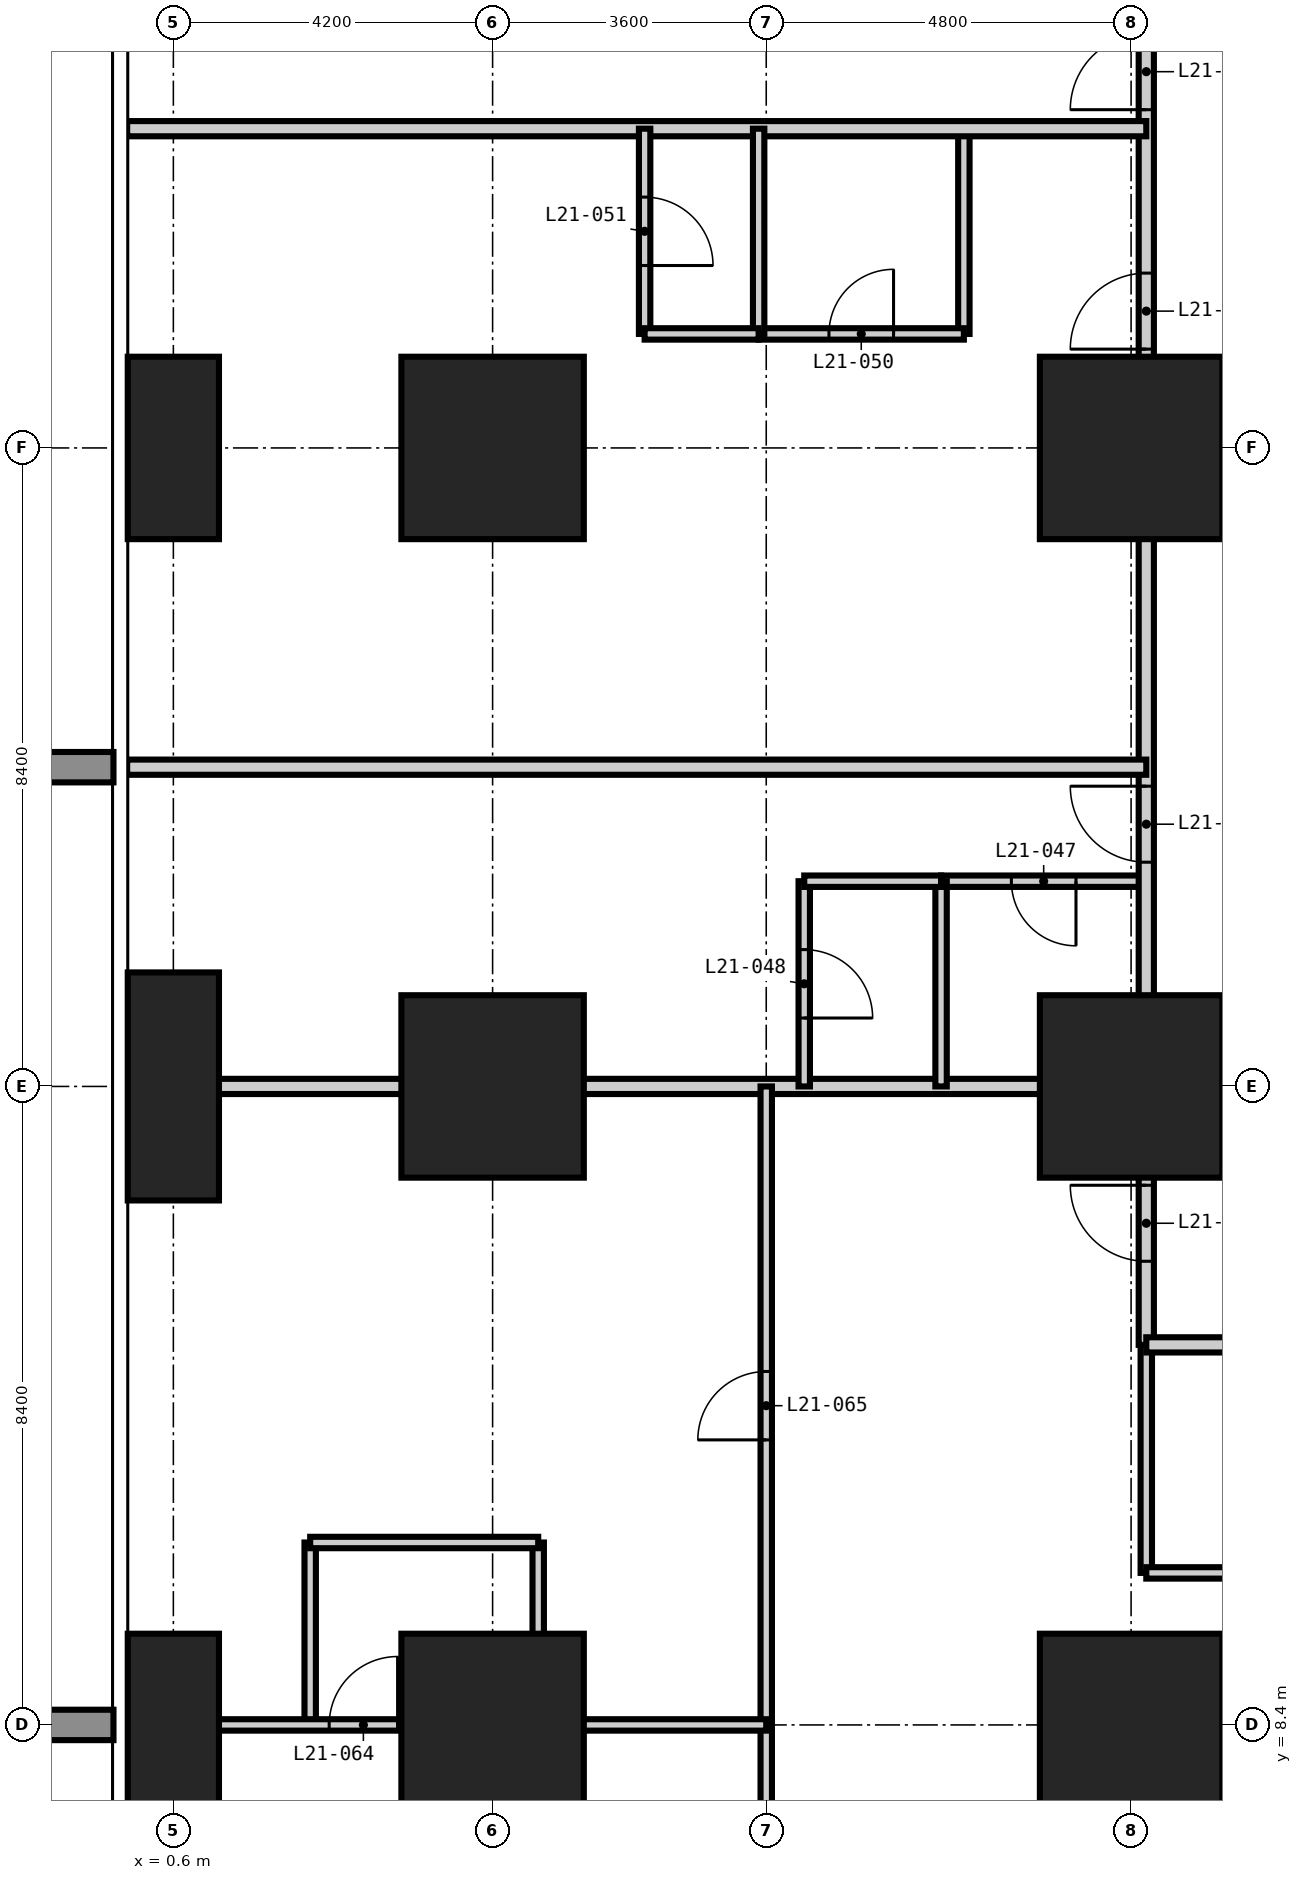
"""IFC4 building model, lengths in metres.
Left out: names, types, materials, properties, quantities, classifications, styles, units other than length and angle.
Written with IfcOpenShell. Run it as: python <this file> out.ifc"""

import sys

from ifc_helpers import new_model, si_unit, direction, frame, frame_2d, origin, origin_2d, place, context, subcontext, project, spatial, rectangle, extrude, element, fill, save


model = new_model("IFC4")
c1 = context("Model", 3, precision=1e-05, world=origin(), true_north=direction((0.0, 1.0)))
c2 = subcontext(c1, "Body", "Model", "MODEL_VIEW")
j1 = project(units=[si_unit("LENGTHUNIT", "METRE"), si_unit("PLANEANGLEUNIT", "RADIAN")], contexts=[c1])
p1 = place(None, origin())
s1 = spatial("IfcSite", under=j1, at=p1, CompositionType="ELEMENT")
p2 = place(p1, origin())
s2 = spatial("IfcBuilding", under=s1, at=p2, CompositionType="ELEMENT")
p3 = place(p2, frame((0.0, 0.0, 84.6)))
s3 = spatial("IfcBuildingStorey", under=s2, at=p3, CompositionType="ELEMENT", Elevation=84.6)
p4 = place(p3, frame((0.6, 8.4, -0.35), z_axis=(0.0, 0.0, 1.0), x_axis=(1.0, 0.0, 0.0)))
e1 = element("IfcColumn", 1, at=p4, inside=s3, PredefinedType="COLUMN", context=c2, shape_type="SweptSolid", body=[
    extrude(rectangle(XDim=1.2, YDim=2.4, at=origin_2d()), origin(), (0.0, 0.0, 1.0), 3.55),
])
p5 = place(p3, frame((0.6, 16.8, -0.35), z_axis=(0.0, 0.0, 1.0), x_axis=(1.0, 0.0, 0.0)))
e2 = element("IfcColumn", 2, at=p5, inside=s3, PredefinedType="COLUMN", context=c2, shape_type="SweptSolid", body=[
    extrude(rectangle(XDim=1.2, YDim=3.0, at=origin_2d()), origin(), (0.0, 0.0, 1.0), 3.55),
])
p6 = place(p3, frame((0.6, 25.2, -0.35), z_axis=(0.0, 0.0, 1.0), x_axis=(1.0, 0.0, 0.0)))
e3 = element("IfcColumn", 3, at=p6, inside=s3, PredefinedType="COLUMN", context=c2, shape_type="SweptSolid", body=[
    extrude(rectangle(XDim=1.2, YDim=2.4, at=origin_2d()), origin(), (0.0, 0.0, 1.0), 3.55),
])
for number, where, z_axis, x_axis in (
    (4, (4.8, 8.4, -0.35), (0.0, 0.0, 1.0), (1.0, 0.0, 0.0)),
    (5, (4.8, 16.8, -0.35), (0.0, 0.0, 1.0), (1.0, 0.0, 0.0)),
    (6, (4.8, 25.2, -0.35), (0.0, 0.0, 1.0), (1.0, 0.0, 0.0)),
    (7, (13.2, 8.4, -0.35), (0.0, 0.0, 1.0), (1.0, 0.0, 0.0)),
    (8, (13.2, 16.8, -0.35), (0.0, 0.0, 1.0), (1.0, 0.0, 0.0)),
    (9, (13.2, 25.2, -0.35), (0.0, 0.0, 1.0), (1.0, 0.0, 0.0)),
):
    element("IfcColumn", number, at=place(p3, frame(where, z_axis=z_axis, x_axis=x_axis)), inside=s3, PredefinedType="COLUMN", context=c2, shape_type="SweptSolid", body=[
        extrude(rectangle(XDim=2.4, YDim=2.4, at=origin_2d()), origin(), (0.0, 0.0, 1.0), 3.55),
    ])
p7 = place(p3, frame((5.4, 4.8, 0.0), z_axis=(0.0, 0.0, 1.0), x_axis=(0.0, 1.0, 0.0)))
e10 = element("IfcWall", 10, at=p7, inside=s3, PredefinedType="PARTITIONING", context=c2, shape_type="SweptSolid", body=[
    extrude(rectangle(XDim=3.6, YDim=0.15, at=frame_2d((1.8, 0.0))), origin(), (0.0, 0.0, 1.0), 3.2),
])
p8 = place(p7, frame((1.375, 0.0, 0.0)))
e11 = element("IfcOpeningElement", 11, at=p8, cuts=e10, PredefinedType="OPENING", context=c2, shape_type="SweptSolid", body=[
    extrude(rectangle(XDim=0.85, YDim=2.1, at=frame_2d((0.425, 1.05))), frame((0.0, 0.085, 0.0), z_axis=(0.0, -1.0, 0.0), x_axis=(1.0, 0.0, 0.0)), (0.0, 0.0, 1.0), 0.17),
])
p9 = place(p3, frame((11.0, 26.7, 0.0), z_axis=(0.0, 0.0, 1.0), x_axis=(0.0, 1.0, 0.0)))
e12 = element("IfcWall", 12, at=p9, inside=s3, PredefinedType="PARTITIONING", context=c2, shape_type="SweptSolid", body=[
    extrude(rectangle(XDim=2.7, YDim=0.15, at=frame_2d((1.35, 0.0))), origin(), (0.0, 0.0, 1.0), 3.2),
])
p10 = place(p3, frame((13.4, 10.4, 0.0), z_axis=(0.0, 0.0, 1.0), x_axis=(0.0, 1.0, 0.0)))
e13 = element("IfcWall", 13, at=p10, inside=s3, PredefinedType="PARTITIONING", context=c2, shape_type="SweptSolid", body=[
    extrude(rectangle(XDim=3.0, YDim=0.15, at=frame_2d((1.5, 0.0))), origin(), (0.0, 0.0, 1.0), 3.2),
])
p11 = place(p3, frame((13.4, 10.4, 0.0), z_axis=(0.0, 0.0, 1.0), x_axis=(1.0, 0.0, 0.0)))
e14 = element("IfcWall", 14, at=p11, inside=s3, PredefinedType="PARTITIONING", context=c2, shape_type="SweptSolid", body=[
    extrude(rectangle(XDim=3.4, YDim=0.15, at=frame_2d((1.7, 0.0))), origin(), (0.0, 0.0, 1.0), 3.2),
])
p12 = place(p11, frame((1.275, 0.0, 0.0)))
e15 = element("IfcOpeningElement", 15, at=p12, cuts=e14, PredefinedType="OPENING", context=c2, shape_type="SweptSolid", body=[
    extrude(rectangle(XDim=0.85, YDim=2.1, at=frame_2d((0.425, 1.05))), frame((0.0, 0.085, 0.0), z_axis=(0.0, -1.0, 0.0), x_axis=(1.0, 0.0, 0.0)), (0.0, 0.0, 1.0), 0.17),
])
p13 = place(p3, frame((10.7, 19.5, 0.0), z_axis=(0.0, 0.0, 1.0), x_axis=(1.0, 0.0, 0.0)))
e16 = element("IfcWall", 16, at=p13, inside=s3, PredefinedType="PARTITIONING", context=c2, shape_type="SweptSolid", body=[
    extrude(rectangle(XDim=2.7, YDim=0.15, at=frame_2d((1.35, 0.0))), origin(), (0.0, 0.0, 1.0), 3.2),
])
p14 = place(p13, frame((0.925, 0.0, 0.0)))
e17 = element("IfcOpeningElement", 17, at=p14, cuts=e16, PredefinedType="OPENING", context=c2, shape_type="SweptSolid", body=[
    extrude(rectangle(XDim=0.85, YDim=2.1, at=frame_2d((0.425, 1.05))), frame((0.0, 0.085, 0.0), z_axis=(0.0, -1.0, 0.0), x_axis=(1.0, 0.0, 0.0)), (0.0, 0.0, 1.0), 0.17),
])
p15 = place(p3, frame((8.3, 26.7, 0.0), z_axis=(0.0, 0.0, 1.0), x_axis=(1.0, 0.0, 0.0)))
e18 = element("IfcWall", 18, at=p15, inside=s3, PredefinedType="PARTITIONING", context=c2, shape_type="SweptSolid", body=[
    extrude(rectangle(XDim=2.7, YDim=0.15, at=frame_2d((1.35, 0.0))), origin(), (0.0, 0.0, 1.0), 3.2),
])
p16 = place(p15, frame((0.925, 0.0, 0.0)))
e19 = element("IfcOpeningElement", 19, at=p16, cuts=e18, PredefinedType="OPENING", context=c2, shape_type="SweptSolid", body=[
    extrude(rectangle(XDim=0.85, YDim=2.1, at=frame_2d((0.425, 1.05))), frame((0.0, 0.085, 0.0), z_axis=(0.0, -1.0, 0.0), x_axis=(1.0, 0.0, 0.0)), (0.0, 0.0, 1.0), 0.17),
])
p17 = place(p3, frame((13.4, 13.4, 0.0), z_axis=(0.0, 0.0, 1.0), x_axis=(0.0, 1.0, 0.0)))
e20 = element("IfcWall", 20, at=p17, inside=s3, PredefinedType="PARTITIONING", context=c2, shape_type="SweptSolid", body=[
    extrude(rectangle(XDim=22.6, YDim=0.2, at=frame_2d((11.3, 0.0))), origin(), (0.0, 0.0, 1.0), 3.2),
])
p18 = place(p17, frame((6.35, 0.0, 0.0)))
e21 = element("IfcOpeningElement", 21, at=p18, cuts=e20, PredefinedType="OPENING", context=c2, shape_type="SweptSolid", body=[
    extrude(rectangle(XDim=1.0, YDim=2.2, at=frame_2d((0.5, 1.1))), frame((0.0, 0.11, 0.0), z_axis=(0.0, -1.0, 0.0), x_axis=(1.0, 0.0, 0.0)), (0.0, 0.0, 1.0), 0.22),
])
p19 = place(p17, frame((13.1, 0.0, 0.0)))
e22 = element("IfcOpeningElement", 22, at=p19, cuts=e20, PredefinedType="OPENING", context=c2, shape_type="SweptSolid", body=[
    extrude(rectangle(XDim=1.0, YDim=2.2, at=frame_2d((0.5, 1.1))), frame((0.0, 0.11, 0.0), z_axis=(0.0, -1.0, 0.0), x_axis=(1.0, 0.0, 0.0)), (0.0, 0.0, 1.0), 0.22),
])
p20 = place(p17, frame((16.25, 0.0, 0.0)))
e23 = element("IfcOpeningElement", 23, at=p20, cuts=e20, PredefinedType="OPENING", context=c2, shape_type="SweptSolid", body=[
    extrude(rectangle(XDim=1.0, YDim=2.2, at=frame_2d((0.5, 1.1))), frame((0.0, 0.11, 0.0), z_axis=(0.0, -1.0, 0.0), x_axis=(1.0, 0.0, 0.0)), (0.0, 0.0, 1.0), 0.22),
])
p21 = place(p17, frame((1.1, 0.0, 0.0)))
e24 = element("IfcOpeningElement", 24, at=p21, cuts=e20, PredefinedType="OPENING", context=c2, shape_type="SweptSolid", body=[
    extrude(rectangle(XDim=1.0, YDim=2.2, at=frame_2d((0.5, 1.1))), frame((0.0, 0.11, 0.0), z_axis=(0.0, -1.0, 0.0), x_axis=(1.0, 0.0, 0.0)), (0.0, 0.0, 1.0), 0.22),
])
p22 = place(p3, frame((46.0, 13.4, 0.0), z_axis=(0.0, 0.0, 1.0), x_axis=(-1.0, 0.0, 0.0)))
e25 = element("IfcWall", 25, at=p22, inside=s3, PredefinedType="PARTITIONING", context=c2, shape_type="SweptSolid", body=[
    extrude(rectangle(XDim=32.6, YDim=0.2, at=frame_2d((16.3, 0.0))), origin(), (0.0, 0.0, 1.0), 3.2),
])
p23 = place(p22, frame((26.6, 0.0, 0.0)))
e26 = element("IfcOpeningElement", 26, at=p23, cuts=e25, PredefinedType="OPENING", context=c2, shape_type="SweptSolid", body=[
    extrude(rectangle(XDim=1.0, YDim=2.2, at=frame_2d((0.5, 1.1))), frame((0.0, 0.11, 0.0), z_axis=(0.0, -1.0, 0.0), x_axis=(1.0, 0.0, 0.0)), (0.0, 0.0, 1.0), 0.22),
])
p24 = place(p22, frame((19.1, 0.0, 0.0)))
e27 = element("IfcOpeningElement", 27, at=p24, cuts=e25, PredefinedType="OPENING", context=c2, shape_type="SweptSolid", body=[
    extrude(rectangle(XDim=1.0, YDim=2.2, at=frame_2d((0.5, 1.1))), frame((0.0, 0.11, 0.0), z_axis=(0.0, -1.0, 0.0), x_axis=(1.0, 0.0, 0.0)), (0.0, 0.0, 1.0), 0.22),
])
p25 = place(p22, frame((13.1, 0.0, 0.0)))
e28 = element("IfcOpeningElement", 28, at=p25, cuts=e25, PredefinedType="OPENING", context=c2, shape_type="SweptSolid", body=[
    extrude(rectangle(XDim=1.0, YDim=2.2, at=frame_2d((0.5, 1.1))), frame((0.0, 0.11, 0.0), z_axis=(0.0, -1.0, 0.0), x_axis=(1.0, 0.0, 0.0)), (0.0, 0.0, 1.0), 0.22),
])
p26 = place(p22, frame((5.6, 0.0, 0.0)))
e29 = element("IfcOpeningElement", 29, at=p26, cuts=e25, PredefinedType="OPENING", context=c2, shape_type="SweptSolid", body=[
    extrude(rectangle(XDim=1.0, YDim=2.2, at=frame_2d((0.5, 1.1))), frame((0.0, 0.11, 0.0), z_axis=(0.0, -1.0, 0.0), x_axis=(1.0, 0.0, 0.0)), (0.0, 0.0, 1.0), 0.22),
])
for number, where, z_axis, x_axis in (
    (30, (-0.008, 16.8, 0.0), (0.0, 0.0, 1.0), (1.0, 0.0, 0.0)),
    (31, (-0.008, 21.0, 0.0), (0.0, 0.0, 1.0), (1.0, 0.0, 0.0)),
    (32, (-0.008, 29.4, 0.0), (0.0, 0.0, 1.0), (1.0, 0.0, 0.0)),
):
    element("IfcWall", number, at=place(p3, frame(where, z_axis=z_axis, x_axis=x_axis)), inside=s3, PredefinedType="PARTITIONING", context=c2, shape_type="SweptSolid", body=[
        extrude(rectangle(XDim=13.408, YDim=0.2, at=frame_2d((6.704, 0.0))), origin(), (0.0, 0.0, 1.0), 3.2),
    ])
for number, where, z_axis, x_axis in (
    (33, (2.4, 8.4, 0.0), (0.0, 0.0, 1.0), (0.0, 1.0, 0.0)),
    (34, (5.4, 8.4, 0.0), (0.0, 0.0, 1.0), (0.0, 1.0, 0.0)),
):
    element("IfcWall", number, at=place(p3, frame(where, z_axis=z_axis, x_axis=x_axis)), inside=s3, PredefinedType="PARTITIONING", context=c2, shape_type="SweptSolid", body=[
        extrude(rectangle(XDim=2.4, YDim=0.15, at=frame_2d((1.2, 0.0))), origin(), (0.0, 0.0, 1.0), 3.2),
    ])
p27 = place(p3, frame((6.8, 26.7, 0.0), z_axis=(0.0, 0.0, 1.0), x_axis=(0.0, 1.0, 0.0)))
e35 = element("IfcWall", 35, at=p27, inside=s3, PredefinedType="PARTITIONING", context=c2, shape_type="SweptSolid", body=[
    extrude(rectangle(XDim=2.7, YDim=0.15, at=frame_2d((1.35, 0.0))), origin(), (0.0, 0.0, 1.0), 3.2),
])
p28 = place(p27, frame((0.9, 0.0, 0.0)))
e36 = element("IfcOpeningElement", 36, at=p28, cuts=e35, PredefinedType="OPENING", context=c2, shape_type="SweptSolid", body=[
    extrude(rectangle(XDim=0.9, YDim=2.1, at=frame_2d((0.45, 1.05))), frame((0.0, 0.085, 0.0), z_axis=(0.0, -1.0, 0.0), x_axis=(1.0, 0.0, 0.0)), (0.0, 0.0, 1.0), 0.17),
])
p29 = place(p3, frame((8.3, 26.7, 0.0), z_axis=(0.0, 0.0, 1.0), x_axis=(0.0, 1.0, 0.0)))
e37 = element("IfcWall", 37, at=p29, inside=s3, PredefinedType="PARTITIONING", context=c2, shape_type="SweptSolid", body=[
    extrude(rectangle(XDim=2.7, YDim=0.15, at=frame_2d((1.35, 0.0))), origin(), (0.0, 0.0, 1.0), 3.2),
])
p30 = place(p3, frame((8.4, -0.008, 0.0), z_axis=(0.0, 0.0, 1.0), x_axis=(0.0, 1.0, 0.0)))
e38 = element("IfcWall", 38, at=p30, inside=s3, PredefinedType="PARTITIONING", context=c2, shape_type="SweptSolid", body=[
    extrude(rectangle(XDim=16.808, YDim=0.15, at=frame_2d((8.404, 0.0))), origin(), (0.0, 0.0, 1.0), 3.2),
])
p31 = place(p30, frame((1.958, 0.0, 0.0)))
e39 = element("IfcOpeningElement", 39, at=p31, cuts=e38, PredefinedType="OPENING", context=c2, shape_type="SweptSolid", body=[
    extrude(rectangle(XDim=0.9, YDim=2.1, at=frame_2d((0.45, 1.05))), frame((0.0, 0.085, 0.0), z_axis=(0.0, -1.0, 0.0), x_axis=(1.0, 0.0, 0.0)), (0.0, 0.0, 1.0), 0.17),
])
p32 = place(p30, frame((12.158, 0.0, 0.0)))
e40 = element("IfcOpeningElement", 40, at=p32, cuts=e38, PredefinedType="OPENING", context=c2, shape_type="SweptSolid", body=[
    extrude(rectangle(XDim=0.9, YDim=2.1, at=frame_2d((0.45, 1.05))), frame((0.0, 0.085, 0.0), z_axis=(0.0, -1.0, 0.0), x_axis=(1.0, 0.0, 0.0)), (0.0, 0.0, 1.0), 0.17),
])
p33 = place(p3, frame((8.9, 16.8, 0.0), z_axis=(0.0, 0.0, 1.0), x_axis=(0.0, 1.0, 0.0)))
e41 = element("IfcWall", 41, at=p33, inside=s3, PredefinedType="PARTITIONING", context=c2, shape_type="SweptSolid", body=[
    extrude(rectangle(XDim=2.7, YDim=0.15, at=frame_2d((1.35, 0.0))), origin(), (0.0, 0.0, 1.0), 3.2),
])
p34 = place(p33, frame((0.9, 0.0, 0.0)))
e42 = element("IfcOpeningElement", 42, at=p34, cuts=e41, PredefinedType="OPENING", context=c2, shape_type="SweptSolid", body=[
    extrude(rectangle(XDim=0.9, YDim=2.1, at=frame_2d((0.45, 1.05))), frame((0.0, 0.085, 0.0), z_axis=(0.0, -1.0, 0.0), x_axis=(1.0, 0.0, 0.0)), (0.0, 0.0, 1.0), 0.17),
])
p35 = place(p3, frame((10.7, 16.8, 0.0), z_axis=(0.0, 0.0, 1.0), x_axis=(0.0, 1.0, 0.0)))
e43 = element("IfcWall", 43, at=p35, inside=s3, PredefinedType="PARTITIONING", context=c2, shape_type="SweptSolid", body=[
    extrude(rectangle(XDim=2.7, YDim=0.15, at=frame_2d((1.35, 0.0))), origin(), (0.0, 0.0, 1.0), 3.2),
])
p36 = place(p3, frame((-0.008, 8.4, 0.0), z_axis=(0.0, 0.0, 1.0), x_axis=(1.0, 0.0, 0.0)))
e44 = element("IfcWall", 44, at=p36, inside=s3, PredefinedType="PARTITIONING", context=c2, shape_type="SweptSolid", body=[
    extrude(rectangle(XDim=8.408, YDim=0.15, at=frame_2d((4.204, 0.0))), origin(), (0.0, 0.0, 1.0), 3.2),
])
p37 = place(p36, frame((2.658, 0.0, 0.0)))
e45 = element("IfcOpeningElement", 45, at=p37, cuts=e44, PredefinedType="OPENING", context=c2, shape_type="SweptSolid", body=[
    extrude(rectangle(XDim=0.9, YDim=2.1, at=frame_2d((0.45, 1.05))), frame((0.0, 0.085, 0.0), z_axis=(0.0, -1.0, 0.0), x_axis=(1.0, 0.0, 0.0)), (0.0, 0.0, 1.0), 0.17),
])
p38 = place(p3, frame((2.4, 10.8, 0.0), z_axis=(0.0, 0.0, 1.0), x_axis=(1.0, 0.0, 0.0)))
e46 = element("IfcWall", 46, at=p38, inside=s3, PredefinedType="PARTITIONING", context=c2, shape_type="SweptSolid", body=[
    extrude(rectangle(XDim=3.0, YDim=0.15, at=frame_2d((1.5, 0.0))), origin(), (0.0, 0.0, 1.0), 3.2),
])
p39 = place(p3, frame((8.9, 19.5, 0.0), z_axis=(0.0, 0.0, 1.0), x_axis=(1.0, 0.0, 0.0)))
e47 = element("IfcWall", 47, at=p39, inside=s3, PredefinedType="PARTITIONING", context=c2, shape_type="SweptSolid", body=[
    extrude(rectangle(XDim=1.8, YDim=0.15, at=frame_2d((0.9, 0.0))), origin(), (0.0, 0.0, 1.0), 3.2),
])
p40 = place(p3, frame((6.8, 26.7, 0.0), z_axis=(0.0, 0.0, 1.0), x_axis=(1.0, 0.0, 0.0)))
e48 = element("IfcWall", 48, at=p40, inside=s3, PredefinedType="PARTITIONING", context=c2, shape_type="SweptSolid", body=[
    extrude(rectangle(XDim=1.5, YDim=0.15, at=frame_2d((0.75, 0.0))), origin(), (0.0, 0.0, 1.0), 3.2),
])
p41 = place(p18, origin())
e49 = element("IfcDoor", 49, at=p41, inside=s3, OperationType="SINGLE_SWING_RIGHT", PredefinedType="DOOR", context=c2, shape_type="SweptSolid", body=[
    extrude(rectangle(XDim=1.0, YDim=2.2, at=frame_2d((0.5, 1.1))), frame((0.0, 0.025, 0.0), z_axis=(0.0, -1.0, 0.0), x_axis=(1.0, 0.0, 0.0)), (0.0, 0.0, 1.0), 0.05),
])
fill(e21, e49)
p42 = place(p14, frame((0.85, 0.0, 0.0), z_axis=(0.0, 0.0, 1.0), x_axis=(-1.0, 0.0, 0.0)))
e50 = element("IfcDoor", 50, at=p42, inside=s3, OperationType="SINGLE_SWING_LEFT", PredefinedType="DOOR", context=c2, shape_type="SweptSolid", body=[
    extrude(rectangle(XDim=0.85, YDim=2.1, at=frame_2d((0.425, 1.05))), frame((0.0, 0.025, 0.0), z_axis=(0.0, -1.0, 0.0), x_axis=(1.0, 0.0, 0.0)), (0.0, 0.0, 1.0), 0.05),
])
fill(e17, e50)
p43 = place(p34, frame((0.9, 0.0, 0.0), z_axis=(0.0, 0.0, 1.0), x_axis=(-1.0, 0.0, 0.0)))
e51 = element("IfcDoor", 51, at=p43, inside=s3, OperationType="SINGLE_SWING_RIGHT", PredefinedType="DOOR", context=c2, shape_type="SweptSolid", body=[
    extrude(rectangle(XDim=0.9, YDim=2.1, at=frame_2d((0.45, 1.05))), frame((0.0, 0.025, 0.0), z_axis=(0.0, -1.0, 0.0), x_axis=(1.0, 0.0, 0.0)), (0.0, 0.0, 1.0), 0.05),
])
fill(e42, e51)
p44 = place(p19, origin())
e52 = element("IfcDoor", 52, at=p44, inside=s3, OperationType="SINGLE_SWING_LEFT", PredefinedType="DOOR", context=c2, shape_type="SweptSolid", body=[
    extrude(rectangle(XDim=1.0, YDim=2.2, at=frame_2d((0.5, 1.1))), frame((0.0, 0.025, 0.0), z_axis=(0.0, -1.0, 0.0), x_axis=(1.0, 0.0, 0.0)), (0.0, 0.0, 1.0), 0.05),
])
fill(e22, e52)
p45 = place(p16, origin())
e53 = element("IfcDoor", 53, at=p45, inside=s3, OperationType="SINGLE_SWING_RIGHT", PredefinedType="DOOR", context=c2, shape_type="SweptSolid", body=[
    extrude(rectangle(XDim=0.85, YDim=2.1, at=frame_2d((0.425, 1.05))), frame((0.0, 0.025, 0.0), z_axis=(0.0, -1.0, 0.0), x_axis=(1.0, 0.0, 0.0)), (0.0, 0.0, 1.0), 0.05),
])
fill(e19, e53)
p46 = place(p28, frame((0.9, 0.0, 0.0), z_axis=(0.0, 0.0, 1.0), x_axis=(-1.0, 0.0, 0.0)))
e54 = element("IfcDoor", 54, at=p46, inside=s3, OperationType="SINGLE_SWING_RIGHT", PredefinedType="DOOR", context=c2, shape_type="SweptSolid", body=[
    extrude(rectangle(XDim=0.9, YDim=2.1, at=frame_2d((0.45, 1.05))), frame((0.0, 0.025, 0.0), z_axis=(0.0, -1.0, 0.0), x_axis=(1.0, 0.0, 0.0)), (0.0, 0.0, 1.0), 0.05),
])
fill(e36, e54)
p47 = place(p20, origin())
e55 = element("IfcDoor", 55, at=p47, inside=s3, OperationType="SINGLE_SWING_LEFT", PredefinedType="DOOR", context=c2, shape_type="SweptSolid", body=[
    extrude(rectangle(XDim=1.0, YDim=2.2, at=frame_2d((0.5, 1.1))), frame((0.0, 0.025, 0.0), z_axis=(0.0, -1.0, 0.0), x_axis=(1.0, 0.0, 0.0)), (0.0, 0.0, 1.0), 0.05),
])
fill(e23, e55)
p48 = place(p21, origin())
e56 = element("IfcDoor", 56, at=p48, inside=s3, OperationType="SINGLE_SWING_RIGHT", PredefinedType="DOOR", context=c2, shape_type="SweptSolid", body=[
    extrude(rectangle(XDim=1.0, YDim=2.2, at=frame_2d((0.5, 1.1))), frame((0.0, 0.025, 0.0), z_axis=(0.0, -1.0, 0.0), x_axis=(1.0, 0.0, 0.0)), (0.0, 0.0, 1.0), 0.05),
])
fill(e24, e56)
p49 = place(p37, origin())
e57 = element("IfcDoor", 57, at=p49, inside=s3, OperationType="SINGLE_SWING_RIGHT", PredefinedType="DOOR", context=c2, shape_type="SweptSolid", body=[
    extrude(rectangle(XDim=0.9, YDim=2.1, at=frame_2d((0.45, 1.05))), frame((0.0, 0.025, 0.0), z_axis=(0.0, -1.0, 0.0), x_axis=(1.0, 0.0, 0.0)), (0.0, 0.0, 1.0), 0.05),
])
fill(e45, e57)
p50 = place(p32, origin())
e58 = element("IfcDoor", 58, at=p50, inside=s3, OperationType="SINGLE_SWING_LEFT", PredefinedType="DOOR", context=c2, shape_type="SweptSolid", body=[
    extrude(rectangle(XDim=0.9, YDim=2.1, at=frame_2d((0.45, 1.05))), frame((0.0, 0.025, 0.0), z_axis=(0.0, -1.0, 0.0), x_axis=(1.0, 0.0, 0.0)), (0.0, 0.0, 1.0), 0.05),
])
fill(e40, e58)
save(model, sys.argv[1])
